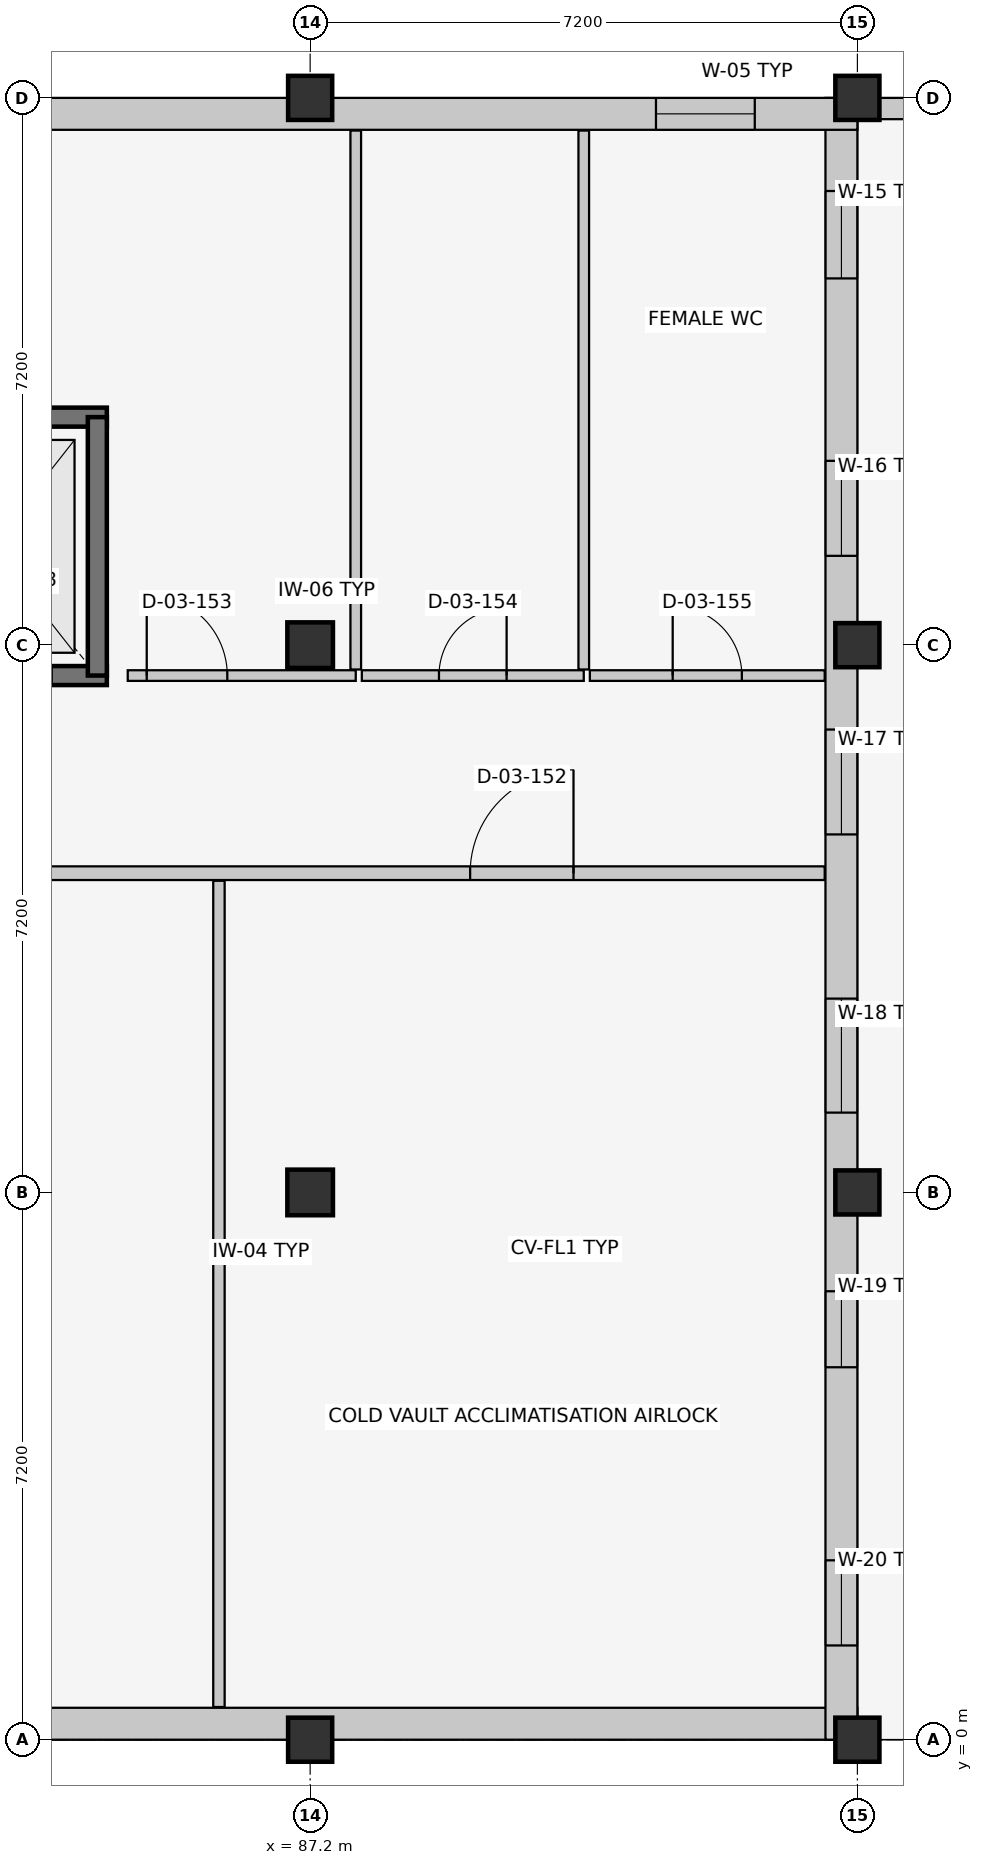
"""IFC4 building model, lengths in metres.
Left out: names, types, materials, properties, quantities, classifications, styles, units other than length and angle.
Written with IfcOpenShell. Run it as: python <this file> out.ifc"""

import sys

from ifc_helpers import new_model, si_unit, direction, frame, frame_2d, origin, origin_2d, place, context, subcontext, project, spatial, rectangle, extrude, element, fill, save


model = new_model("IFC4")
c1 = context("Model", 3, precision=1e-05, world=origin(), true_north=direction((0.0, 1.0)))
c2 = subcontext(c1, "Body", "Model", "MODEL_VIEW")
j1 = project(units=[si_unit("LENGTHUNIT", "METRE"), si_unit("PLANEANGLEUNIT", "RADIAN")], contexts=[c1])
p1 = place(None, origin())
s1 = spatial("IfcSite", under=j1, at=p1, CompositionType="ELEMENT")
p2 = place(p1, origin())
s2 = spatial("IfcBuilding", under=s1, at=p2, CompositionType="ELEMENT")
p3 = place(p2, frame((0.0, 0.0, 13.8)))
s3 = spatial("IfcBuildingStorey", under=s2, at=p3, CompositionType="ELEMENT", Elevation=13.8)
p4 = place(p3, frame((87.2, 0.0, 0.0), z_axis=(0.0, 0.0, 1.0), x_axis=(1.0, 0.0, 0.0)))
e1 = element("IfcColumn", 1, at=p4, inside=s3, PredefinedType="COLUMN", context=c2, shape_type="SweptSolid", body=[
    extrude(rectangle(XDim=0.58, YDim=0.58, at=origin_2d()), origin(), (0.0, 0.0, 1.0), 4.2),
])
for number, where, z_axis, x_axis in (
    (2, (87.2, 7.2, 0.0), (0.0, 0.0, 1.0), (1.0, 0.0, 0.0)),
    (3, (87.2, 14.4, 0.0), (0.0, 0.0, 1.0), (1.0, 0.0, 0.0)),
):
    element("IfcColumn", number, at=place(p3, frame(where, z_axis=z_axis, x_axis=x_axis)), inside=s3, PredefinedType="COLUMN", context=c2, shape_type="SweptSolid", body=[
        extrude(rectangle(XDim=0.6, YDim=0.6, at=origin_2d()), origin(), (0.0, 0.0, 1.0), 4.2),
    ])
for number, where, z_axis, x_axis in (
    (4, (87.2, 21.6, 0.0), (0.0, 0.0, 1.0), (1.0, 0.0, 0.0)),
    (5, (94.4, 0.0, 0.0), (0.0, 0.0, 1.0), (1.0, 0.0, 0.0)),
    (6, (94.4, 7.2, 0.0), (0.0, 0.0, 1.0), (1.0, 0.0, 0.0)),
    (7, (94.4, 14.4, 0.0), (0.0, 0.0, 1.0), (1.0, 0.0, 0.0)),
    (8, (94.4, 21.6, 0.0), (0.0, 0.0, 1.0), (1.0, 0.0, 0.0)),
):
    element("IfcColumn", number, at=place(p3, frame(where, z_axis=z_axis, x_axis=x_axis)), inside=s3, PredefinedType="COLUMN", context=c2, shape_type="SweptSolid", body=[
        extrude(rectangle(XDim=0.58, YDim=0.58, at=origin_2d()), origin(), (0.0, 0.0, 1.0), 4.2),
    ])
p5 = place(p3, frame((94.4, 0.21, 0.0), z_axis=(0.0, 0.0, 1.0), x_axis=(-1.0, 0.0, 0.0)))
e9 = element("IfcWall", 9, at=p5, inside=s3, PredefinedType="SOLIDWALL", context=c2, shape_type="SweptSolid", body=[
    extrude(rectangle(XDim=36.0, YDim=0.42, at=frame_2d((18.0, 0.0))), origin(), (0.0, 0.0, 1.0), 3.175),
])
p6 = place(p3, frame((94.19, 21.6, 0.0), z_axis=(0.0, 0.0, 1.0), x_axis=(0.0, -1.0, 0.0)))
e10 = element("IfcWall", 10, at=p6, inside=s3, PredefinedType="SOLIDWALL", context=c2, shape_type="SweptSolid", body=[
    extrude(rectangle(XDim=21.6, YDim=0.42, at=frame_2d((10.8, 0.0))), origin(), (0.0, 0.0, 1.0), 3.135),
])
p7 = place(p6, frame((1.225, 0.0, 0.9)))
e11 = element("IfcOpeningElement", 11, at=p7, cuts=e10, PredefinedType="OPENING", context=c2, shape_type="SweptSolid", body=[
    extrude(rectangle(XDim=1.15, YDim=1.6, at=frame_2d((0.575, 0.8))), frame((0.0, 0.222, 0.0), z_axis=(0.0, -1.0, 0.0), x_axis=(1.0, 0.0, 0.0)), (0.0, 0.0, 1.0), 0.444),
])
p8 = place(p6, frame((4.775, 0.0, 0.9)))
e12 = element("IfcOpeningElement", 12, at=p8, cuts=e10, PredefinedType="OPENING", context=c2, shape_type="SweptSolid", body=[
    extrude(rectangle(XDim=1.25, YDim=1.6, at=frame_2d((0.625, 0.8))), frame((0.0, 0.222, 0.0), z_axis=(0.0, -1.0, 0.0), x_axis=(1.0, 0.0, 0.0)), (0.0, 0.0, 1.0), 0.444),
])
p9 = place(p6, frame((8.31, 0.0, 0.9)))
e13 = element("IfcOpeningElement", 13, at=p9, cuts=e10, PredefinedType="OPENING", context=c2, shape_type="SweptSolid", body=[
    extrude(rectangle(XDim=1.38, YDim=1.6, at=frame_2d((0.69, 0.8))), frame((0.0, 0.222, 0.0), z_axis=(0.0, -1.0, 0.0), x_axis=(1.0, 0.0, 0.0)), (0.0, 0.0, 1.0), 0.444),
])
p10 = place(p6, frame((11.85, 0.0, 0.9)))
e14 = element("IfcOpeningElement", 14, at=p10, cuts=e10, PredefinedType="OPENING", context=c2, shape_type="SweptSolid", body=[
    extrude(rectangle(XDim=1.5, YDim=1.6, at=frame_2d((0.75, 0.8))), frame((0.0, 0.222, 0.0), z_axis=(0.0, -1.0, 0.0), x_axis=(1.0, 0.0, 0.0)), (0.0, 0.0, 1.0), 0.444),
])
p11 = place(p6, frame((15.7, 0.0, 0.9)))
e15 = element("IfcOpeningElement", 15, at=p11, cuts=e10, PredefinedType="OPENING", context=c2, shape_type="SweptSolid", body=[
    extrude(rectangle(XDim=1.0, YDim=1.75, at=frame_2d((0.5, 0.875))), frame((0.0, 0.222, 0.0), z_axis=(0.0, -1.0, 0.0), x_axis=(1.0, 0.0, 0.0)), (0.0, 0.0, 1.0), 0.444),
])
p12 = place(p6, frame((19.24, 0.0, 0.9)))
e16 = element("IfcOpeningElement", 16, at=p12, cuts=e10, PredefinedType="OPENING", context=c2, shape_type="SweptSolid", body=[
    extrude(rectangle(XDim=1.12, YDim=1.75, at=frame_2d((0.56, 0.875))), frame((0.0, 0.222, 0.0), z_axis=(0.0, -1.0, 0.0), x_axis=(1.0, 0.0, 0.0)), (0.0, 0.0, 1.0), 0.444),
])
p13 = place(p3, frame((58.4, 21.39, 0.0), z_axis=(0.0, 0.0, 1.0), x_axis=(1.0, 0.0, 0.0)))
e17 = element("IfcWall", 17, at=p13, inside=s3, PredefinedType="SOLIDWALL", context=c2, shape_type="SweptSolid", body=[
    extrude(rectangle(XDim=36.0, YDim=0.42, at=frame_2d((18.0, 0.0))), origin(), (0.0, 0.0, 1.0), 3.175),
])
p14 = place(p13, frame((1.38, 0.0, 0.9)))
e18 = element("IfcOpeningElement", 18, at=p14, cuts=e17, PredefinedType="OPENING", context=c2, shape_type="SweptSolid", body=[
    extrude(rectangle(XDim=1.24, YDim=1.75, at=frame_2d((0.62, 0.875))), frame((0.0, 0.222, 0.0), z_axis=(0.0, -1.0, 0.0), x_axis=(1.0, 0.0, 0.0)), (0.0, 0.0, 1.0), 0.444),
])
p15 = place(p13, frame((9.28, 0.0, 0.9)))
e19 = element("IfcOpeningElement", 19, at=p15, cuts=e17, PredefinedType="OPENING", context=c2, shape_type="SweptSolid", body=[
    extrude(rectangle(XDim=1.44, YDim=1.75, at=frame_2d((0.72, 0.875))), frame((0.0, 0.222, 0.0), z_axis=(0.0, -1.0, 0.0), x_axis=(1.0, 0.0, 0.0)), (0.0, 0.0, 1.0), 0.444),
])
p16 = place(p13, frame((17.55, 0.0, 0.9)))
e20 = element("IfcOpeningElement", 20, at=p16, cuts=e17, PredefinedType="OPENING", context=c2, shape_type="SweptSolid", body=[
    extrude(rectangle(XDim=0.9, YDim=1.35, at=frame_2d((0.45, 0.675))), frame((0.0, 0.222, 0.0), z_axis=(0.0, -1.0, 0.0), x_axis=(1.0, 0.0, 0.0)), (0.0, 0.0, 1.0), 0.444),
])
p17 = place(p13, frame((33.35, 0.0, 0.9)))
e21 = element("IfcOpeningElement", 21, at=p17, cuts=e17, PredefinedType="OPENING", context=c2, shape_type="SweptSolid", body=[
    extrude(rectangle(XDim=1.3, YDim=1.35, at=frame_2d((0.65, 0.675))), frame((0.0, 0.222, 0.0), z_axis=(0.0, -1.0, 0.0), x_axis=(1.0, 0.0, 0.0)), (0.0, 0.0, 1.0), 0.444),
])
p18 = place(p3, frame((94.55, 21.46, 0.0), z_axis=(0.0, 0.0, 1.0), x_axis=(1.0, 0.0, 0.0)))
e22 = element("IfcWall", 22, at=p18, inside=s3, PredefinedType="PARAPET", context=c2, shape_type="SweptSolid", body=[
    extrude(rectangle(XDim=6.9, YDim=0.28, at=frame_2d((3.45, 0.0))), origin(), (0.0, 0.0, 1.0), 0.65),
])
p19 = place(p3, frame((81.475, 14.0, 0.0), z_axis=(0.0, 0.0, 1.0), x_axis=(1.0, 0.0, 0.0)))
e23 = element("IfcWall", 23, at=p19, inside=s3, PredefinedType="SHEAR", context=c2, shape_type="SweptSolid", body=[
    extrude(rectangle(XDim=3.05, YDim=0.25, at=frame_2d((1.525, 0.0))), origin(), (0.0, 0.0, 1.0), 3.88),
])
p20 = place(p19, frame((0.725, 0.0, 0.0)))
e24 = element("IfcOpeningElement", 24, at=p20, cuts=e23, PredefinedType="OPENING", context=c2, shape_type="SweptSolid", body=[
    extrude(rectangle(XDim=1.6, YDim=2.3, at=frame_2d((0.8, 1.15))), frame((0.0, 0.137, 0.0), z_axis=(0.0, -1.0, 0.0), x_axis=(1.0, 0.0, 0.0)), (0.0, 0.0, 1.0), 0.274),
])
p21 = place(p3, frame((84.525, 17.4, 0.0), z_axis=(0.0, 0.0, 1.0), x_axis=(-1.0, 0.0, 0.0)))
e25 = element("IfcWall", 25, at=p21, inside=s3, PredefinedType="SHEAR", context=c2, shape_type="SweptSolid", body=[
    extrude(rectangle(XDim=3.05, YDim=0.25, at=frame_2d((1.525, 0.0))), origin(), (0.0, 0.0, 1.0), 3.88),
])
p22 = place(p3, frame((84.4, 14.0, 0.0), z_axis=(0.0, 0.0, 1.0), x_axis=(0.0, 1.0, 0.0)))
e26 = element("IfcWall", 26, at=p22, inside=s3, PredefinedType="SHEAR", context=c2, shape_type="SweptSolid", body=[
    extrude(rectangle(XDim=3.4, YDim=0.25, at=frame_2d((1.7, 0.0))), origin(), (0.0, 0.0, 1.0), 3.88),
])
p23 = place(p3, frame((58.83, 11.4, 0.0), z_axis=(0.0, 0.0, 1.0), x_axis=(1.0, 0.0, 0.0)))
e27 = element("IfcWall", 27, at=p23, inside=s3, PredefinedType="PARTITIONING", context=c2, shape_type="SweptSolid", body=[
    extrude(rectangle(XDim=35.14, YDim=0.18, at=frame_2d((17.57, 0.0))), origin(), (0.0, 0.0, 1.0), 3.88),
])
p24 = place(p23, frame((6.995, 0.0, 0.0)))
e28 = element("IfcOpeningElement", 28, at=p24, cuts=e27, PredefinedType="OPENING", context=c2, shape_type="SweptSolid", body=[
    extrude(rectangle(XDim=1.18, YDim=2.2, at=frame_2d((0.59, 1.1))), frame((0.0, 0.102, 0.0), z_axis=(0.0, -1.0, 0.0), x_axis=(1.0, 0.0, 0.0)), (0.0, 0.0, 1.0), 0.204),
])
p25 = place(p23, frame((20.61, 0.0, 0.0)))
e29 = element("IfcOpeningElement", 29, at=p25, cuts=e27, PredefinedType="OPENING", context=c2, shape_type="SweptSolid", body=[
    extrude(rectangle(XDim=1.12, YDim=2.15, at=frame_2d((0.56, 1.075))), frame((0.0, 0.102, 0.0), z_axis=(0.0, -1.0, 0.0), x_axis=(1.0, 0.0, 0.0)), (0.0, 0.0, 1.0), 0.204),
])
p26 = place(p23, frame((30.475, 0.0, 0.0)))
e30 = element("IfcOpeningElement", 30, at=p26, cuts=e27, PredefinedType="OPENING", context=c2, shape_type="SweptSolid", body=[
    extrude(rectangle(XDim=1.36, YDim=2.2, at=frame_2d((0.68, 1.1))), frame((0.0, 0.102, 0.0), z_axis=(0.0, -1.0, 0.0), x_axis=(1.0, 0.0, 0.0)), (0.0, 0.0, 1.0), 0.204),
])
p27 = place(p3, frame((86.0, 0.43, 0.0), z_axis=(0.0, 0.0, 1.0), x_axis=(0.0, 1.0, 0.0)))
e31 = element("IfcWall", 31, at=p27, inside=s3, PredefinedType="PARTITIONING", context=c2, shape_type="SweptSolid", body=[
    extrude(rectangle(XDim=10.87, YDim=0.15, at=frame_2d((5.435, 0.0))), origin(), (0.0, 0.0, 1.0), 3.88),
])
p28 = place(p3, frame((84.8, 14.0, 0.0), z_axis=(0.0, 0.0, 1.0), x_axis=(1.0, 0.0, 0.0)))
e32 = element("IfcWall", 32, at=p28, inside=s3, PredefinedType="PARTITIONING", context=c2, shape_type="SweptSolid", body=[
    extrude(rectangle(XDim=3.0, YDim=0.14, at=frame_2d((1.5, 0.0))), origin(), (0.0, 0.0, 1.0), 3.88),
])
p29 = place(p28, frame((0.25, 0.0, 0.0)))
e33 = element("IfcOpeningElement", 33, at=p29, cuts=e32, PredefinedType="OPENING", context=c2, shape_type="SweptSolid", body=[
    extrude(rectangle(XDim=1.06, YDim=2.1, at=frame_2d((0.53, 1.05))), frame((0.0, 0.082, 0.0), z_axis=(0.0, -1.0, 0.0), x_axis=(1.0, 0.0, 0.0)), (0.0, 0.0, 1.0), 0.164),
])
p30 = place(p3, frame((87.8, 14.08, 0.0), z_axis=(0.0, 0.0, 1.0), x_axis=(0.0, 1.0, 0.0)))
e34 = element("IfcWall", 34, at=p30, inside=s3, PredefinedType="PARTITIONING", context=c2, shape_type="SweptSolid", body=[
    extrude(rectangle(XDim=7.09, YDim=0.14, at=frame_2d((3.545, 0.0))), origin(), (0.0, 0.0, 1.0), 3.88),
])
p31 = place(p3, frame((87.88, 14.0, 0.0), z_axis=(0.0, 0.0, 1.0), x_axis=(1.0, 0.0, 0.0)))
e35 = element("IfcWall", 35, at=p31, inside=s3, PredefinedType="PARTITIONING", context=c2, shape_type="SweptSolid", body=[
    extrude(rectangle(XDim=2.92, YDim=0.14, at=frame_2d((1.46, 0.0))), origin(), (0.0, 0.0, 1.0), 3.88),
])
p32 = place(p31, frame((1.015, 0.0, 0.0)))
e36 = element("IfcOpeningElement", 36, at=p32, cuts=e35, PredefinedType="OPENING", context=c2, shape_type="SweptSolid", body=[
    extrude(rectangle(XDim=0.89, YDim=2.05, at=frame_2d((0.445, 1.025))), frame((0.0, 0.082, 0.0), z_axis=(0.0, -1.0, 0.0), x_axis=(1.0, 0.0, 0.0)), (0.0, 0.0, 1.0), 0.164),
])
p33 = place(p3, frame((90.8, 14.08, 0.0), z_axis=(0.0, 0.0, 1.0), x_axis=(0.0, 1.0, 0.0)))
e37 = element("IfcWall", 37, at=p33, inside=s3, PredefinedType="PARTITIONING", context=c2, shape_type="SweptSolid", body=[
    extrude(rectangle(XDim=7.09, YDim=0.14, at=frame_2d((3.545, 0.0))), origin(), (0.0, 0.0, 1.0), 3.495),
])
p34 = place(p3, frame((90.88, 14.0, 0.0), z_axis=(0.0, 0.0, 1.0), x_axis=(1.0, 0.0, 0.0)))
e38 = element("IfcWall", 38, at=p34, inside=s3, PredefinedType="PARTITIONING", context=c2, shape_type="SweptSolid", body=[
    extrude(rectangle(XDim=3.09, YDim=0.14, at=frame_2d((1.545, 0.0))), origin(), (0.0, 0.0, 1.0), 3.88),
])
p35 = place(p34, frame((1.09, 0.0, 0.0)))
e39 = element("IfcOpeningElement", 39, at=p35, cuts=e38, PredefinedType="OPENING", context=c2, shape_type="SweptSolid", body=[
    extrude(rectangle(XDim=0.91, YDim=2.06, at=frame_2d((0.455, 1.03))), frame((0.0, 0.082, 0.0), z_axis=(0.0, -1.0, 0.0), x_axis=(1.0, 0.0, 0.0)), (0.0, 0.0, 1.0), 0.164),
])
p36 = place(p7, origin())
e40 = element("IfcWindow", 40, at=p36, inside=s3, PartitioningType="SINGLE_PANEL", PredefinedType="WINDOW", context=c2, shape_type="SweptSolid", body=[
    extrude(rectangle(XDim=1.15, YDim=1.6, at=frame_2d((0.575, 0.8))), frame((0.0, 0.03, 0.0), z_axis=(0.0, -1.0, 0.0), x_axis=(1.0, 0.0, 0.0)), (0.0, 0.0, 1.0), 0.06),
])
fill(e11, e40)
p37 = place(p8, origin())
e41 = element("IfcWindow", 41, at=p37, inside=s3, PartitioningType="SINGLE_PANEL", PredefinedType="WINDOW", context=c2, shape_type="SweptSolid", body=[
    extrude(rectangle(XDim=1.25, YDim=1.6, at=frame_2d((0.625, 0.8))), frame((0.0, 0.03, 0.0), z_axis=(0.0, -1.0, 0.0), x_axis=(1.0, 0.0, 0.0)), (0.0, 0.0, 1.0), 0.06),
])
fill(e12, e41)
p38 = place(p9, origin())
e42 = element("IfcWindow", 42, at=p38, inside=s3, PartitioningType="SINGLE_PANEL", PredefinedType="WINDOW", context=c2, shape_type="SweptSolid", body=[
    extrude(rectangle(XDim=1.38, YDim=1.6, at=frame_2d((0.69, 0.8))), frame((0.0, 0.03, 0.0), z_axis=(0.0, -1.0, 0.0), x_axis=(1.0, 0.0, 0.0)), (0.0, 0.0, 1.0), 0.06),
])
fill(e13, e42)
p39 = place(p10, origin())
e43 = element("IfcWindow", 43, at=p39, inside=s3, PartitioningType="SINGLE_PANEL", PredefinedType="WINDOW", context=c2, shape_type="SweptSolid", body=[
    extrude(rectangle(XDim=1.5, YDim=1.6, at=frame_2d((0.75, 0.8))), frame((0.0, 0.03, 0.0), z_axis=(0.0, -1.0, 0.0), x_axis=(1.0, 0.0, 0.0)), (0.0, 0.0, 1.0), 0.06),
])
fill(e14, e43)
p40 = place(p11, origin())
e44 = element("IfcWindow", 44, at=p40, inside=s3, PartitioningType="SINGLE_PANEL", PredefinedType="WINDOW", context=c2, shape_type="SweptSolid", body=[
    extrude(rectangle(XDim=1.0, YDim=1.75, at=frame_2d((0.5, 0.875))), frame((0.0, 0.03, 0.0), z_axis=(0.0, -1.0, 0.0), x_axis=(1.0, 0.0, 0.0)), (0.0, 0.0, 1.0), 0.06),
])
fill(e15, e44)
p41 = place(p12, origin())
e45 = element("IfcWindow", 45, at=p41, inside=s3, PartitioningType="SINGLE_PANEL", PredefinedType="WINDOW", context=c2, shape_type="SweptSolid", body=[
    extrude(rectangle(XDim=1.12, YDim=1.75, at=frame_2d((0.56, 0.875))), frame((0.0, 0.03, 0.0), z_axis=(0.0, -1.0, 0.0), x_axis=(1.0, 0.0, 0.0)), (0.0, 0.0, 1.0), 0.06),
])
fill(e16, e45)
p42 = place(p17, origin())
e46 = element("IfcWindow", 46, at=p42, inside=s3, PartitioningType="SINGLE_PANEL", PredefinedType="WINDOW", context=c2, shape_type="SweptSolid", body=[
    extrude(rectangle(XDim=1.3, YDim=1.35, at=frame_2d((0.65, 0.675))), frame((0.0, 0.03, 0.0), z_axis=(0.0, -1.0, 0.0), x_axis=(1.0, 0.0, 0.0)), (0.0, 0.0, 1.0), 0.06),
])
fill(e21, e46)
p43 = place(p20, origin())
e47 = element("IfcDoor", 47, at=p43, inside=s3, OperationType="DOUBLE_DOOR_SLIDING", PredefinedType="DOOR", context=c2, shape_type="SweptSolid", body=[
    extrude(rectangle(XDim=1.6, YDim=2.3, at=frame_2d((0.8, 1.15))), frame((0.0, 0.025, 0.0), z_axis=(0.0, -1.0, 0.0), x_axis=(1.0, 0.0, 0.0)), (0.0, 0.0, 1.0), 0.05),
])
fill(e24, e47)
p44 = place(p26, origin())
e48 = element("IfcDoor", 48, at=p44, inside=s3, OperationType="SINGLE_SWING_RIGHT", PredefinedType="DOOR", context=c2, shape_type="SweptSolid", body=[
    extrude(rectangle(XDim=1.36, YDim=2.2, at=frame_2d((0.68, 1.1))), frame((0.0, 0.025, 0.0), z_axis=(0.0, -1.0, 0.0), x_axis=(1.0, 0.0, 0.0)), (0.0, 0.0, 1.0), 0.05),
])
fill(e30, e48)
p45 = place(p29, origin())
e49 = element("IfcDoor", 49, at=p45, inside=s3, OperationType="SINGLE_SWING_LEFT", PredefinedType="DOOR", context=c2, shape_type="SweptSolid", body=[
    extrude(rectangle(XDim=1.06, YDim=2.1, at=frame_2d((0.53, 1.05))), frame((0.0, 0.025, 0.0), z_axis=(0.0, -1.0, 0.0), x_axis=(1.0, 0.0, 0.0)), (0.0, 0.0, 1.0), 0.05),
])
fill(e33, e49)
p46 = place(p32, origin())
e50 = element("IfcDoor", 50, at=p46, inside=s3, OperationType="SINGLE_SWING_RIGHT", PredefinedType="DOOR", context=c2, shape_type="SweptSolid", body=[
    extrude(rectangle(XDim=0.89, YDim=2.05, at=frame_2d((0.445, 1.025))), frame((0.0, 0.025, 0.0), z_axis=(0.0, -1.0, 0.0), x_axis=(1.0, 0.0, 0.0)), (0.0, 0.0, 1.0), 0.05),
])
fill(e36, e50)
p47 = place(p35, origin())
e51 = element("IfcDoor", 51, at=p47, inside=s3, OperationType="SINGLE_SWING_LEFT", PredefinedType="DOOR", context=c2, shape_type="SweptSolid", body=[
    extrude(rectangle(XDim=0.91, YDim=2.06, at=frame_2d((0.455, 1.03))), frame((0.0, 0.025, 0.0), z_axis=(0.0, -1.0, 0.0), x_axis=(1.0, 0.0, 0.0)), (0.0, 0.0, 1.0), 0.05),
])
fill(e39, e51)
save(model, sys.argv[1])
